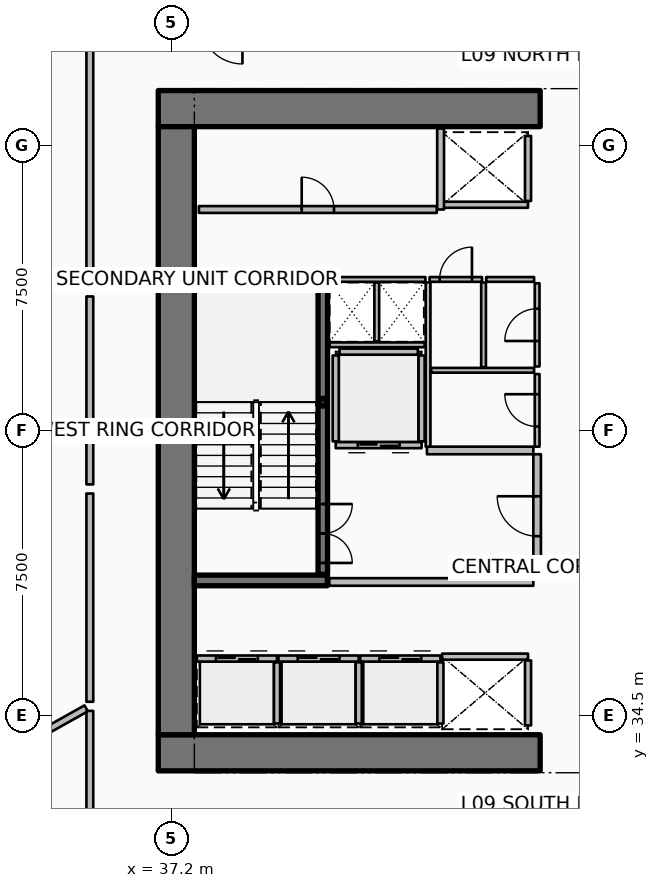
"""IFC4 building model, lengths in metres.
Left out: names, types, materials, properties, quantities, classifications, styles, units other than length and angle.
Written with IfcOpenShell. Run it as: python <this file> out.ifc"""

import sys

from ifc_helpers import new_model, si_unit, direction, frame, frame_2d, origin, origin_2d, place, context, subcontext, project, spatial, rectangle, hollow_rectangle, extrude, element, fill, save


model = new_model("IFC4")
c1 = context("Model", 3, precision=1e-05, world=origin(), true_north=direction((0.0, 1.0)))
c2 = subcontext(c1, "Body", "Model", "MODEL_VIEW")
j1 = project(units=[si_unit("LENGTHUNIT", "METRE"), si_unit("PLANEANGLEUNIT", "RADIAN")], contexts=[c1])
p1 = place(None, origin())
s1 = spatial("IfcSite", under=j1, at=p1, CompositionType="ELEMENT")
p2 = place(p1, origin())
s2 = spatial("IfcBuilding", under=s1, at=p2, CompositionType="ELEMENT")
p3 = place(p2, frame((0.0, 0.0, 41.4)))
s3 = spatial("IfcBuildingStorey", under=s2, at=p3, CompositionType="ELEMENT", Elevation=41.4)
for number, where, z_axis, x_axis in (
    (1, (36.85, 33.525, 0.0), (0.0, 0.0, 1.0), (1.0, 0.0, 0.0)),
    (2, (36.85, 50.475, 0.0), (0.0, 0.0, 1.0), (1.0, 0.0, 0.0)),
):
    element("IfcWall", number, at=place(p3, frame(where, z_axis=z_axis, x_axis=x_axis)), inside=s3, PredefinedType="SHEAR", context=c2, shape_type="SweptSolid", body=[
        extrude(rectangle(XDim=10.05, YDim=0.95, at=frame_2d((5.025, 0.0))), origin(), (0.0, 0.0, 1.0), 3.75),
    ])
p4 = place(p3, frame((37.325, 34.0, 0.0), z_axis=(0.0, 0.0, 1.0), x_axis=(0.0, 1.0, 0.0)))
e3 = element("IfcWall", 3, at=p4, inside=s3, PredefinedType="SHEAR", context=c2, shape_type="SweptSolid", body=[
    extrude(rectangle(XDim=16.0, YDim=0.95, at=frame_2d((8.0, 0.0))), origin(), (0.0, 0.0, 1.0), 3.75),
])
for number, where, z_axis, x_axis in (
    (4, (37.8, 38.06, 0.0), (0.0, 0.0, 1.0), (1.0, 0.0, 0.0)),
    (5, (37.8, 45.94, 0.0), (0.0, 0.0, 1.0), (1.0, 0.0, 0.0)),
):
    element("IfcWall", number, at=place(p3, frame(where, z_axis=z_axis, x_axis=x_axis)), inside=s3, PredefinedType="SHEAR", context=c2, shape_type="SweptSolid", body=[
        extrude(rectangle(XDim=3.5, YDim=0.28, at=frame_2d((1.75, 0.0))), origin(), (0.0, 0.0, 1.0), 3.75),
    ])
p5 = place(p3, frame((41.18, 42.75, 0.0), z_axis=(0.0, 0.0, 1.0), x_axis=(1.0, 0.0, 0.0)))
e6 = element("IfcColumn", 6, at=p5, inside=s3, PredefinedType="COLUMN", context=c2, shape_type="SweptSolid", body=[
    extrude(hollow_rectangle(XDim=0.2, YDim=0.2, WallThickness=0.01, InnerFilletRadius=0.01, OuterFilletRadius=0.02, at=origin_2d()), origin(), (0.0, 0.0, 1.0), 1.67),
])
p6 = place(p3, frame((41.18, 38.22, 0.0), z_axis=(0.0, 0.0, 1.0), x_axis=(0.0, 1.0, 0.0)))
e7 = element("IfcWall", 7, at=p6, inside=s3, PredefinedType="SOLIDWALL", context=c2, shape_type="SweptSolid", body=[
    extrude(rectangle(XDim=7.56, YDim=0.25, at=frame_2d((3.78, 0.0))), origin(), (0.0, 0.0, 1.0), 3.5),
])
p7 = place(p6, frame((0.3, 0.0, 0.0)))
e8 = element("IfcOpeningElement", 8, at=p7, cuts=e7, PredefinedType="OPENING", context=c2, shape_type="SweptSolid", body=[
    extrude(rectangle(XDim=1.55, YDim=2.15, at=frame_2d((0.775, 1.075))), frame((0.0, 0.135, 0.0), z_axis=(0.0, -1.0, 0.0), x_axis=(1.0, 0.0, 0.0)), (0.0, 0.0, 1.0), 0.27),
])
p8 = place(p3, frame((37.865, 36.005, 0.0), z_axis=(0.0, 0.0, 1.0), x_axis=(1.0, 0.0, 0.0)))
e9 = element("IfcWall", 9, at=p8, inside=s3, PredefinedType="PARTITIONING", context=c2, shape_type="SweptSolid", body=[
    extrude(rectangle(XDim=2.11, YDim=0.16, at=frame_2d((1.055, 0.0))), origin(), (0.0, 0.0, 1.0), 3.5),
])
p9 = place(p8, frame((0.505, 0.0, 0.0)))
e10 = element("IfcOpeningElement", 10, at=p9, cuts=e9, PredefinedType="OPENING", context=c2, shape_type="SweptSolid", body=[
    extrude(rectangle(XDim=1.1, YDim=2.1, at=frame_2d((0.55, 1.05))), frame((0.0, 0.09, 0.0), z_axis=(0.0, -1.0, 0.0), x_axis=(1.0, 0.0, 0.0)), (0.0, 0.0, 1.0), 0.18),
])
p10 = place(p3, frame((39.975, 34.295, 0.0), z_axis=(0.0, 0.0, 1.0), x_axis=(0.0, 1.0, 0.0)))
e11 = element("IfcWall", 11, at=p10, inside=s3, PredefinedType="PARTITIONING", context=c2, shape_type="SweptSolid", body=[
    extrude(rectangle(XDim=1.61, YDim=0.16, at=frame_2d((0.805, 0.0))), origin(), (0.0, 0.0, 1.0), 3.5),
])
p11 = place(p3, frame((40.015, 36.005, 0.0), z_axis=(0.0, 0.0, 1.0), x_axis=(1.0, 0.0, 0.0)))
e12 = element("IfcWall", 12, at=p11, inside=s3, PredefinedType="PARTITIONING", context=c2, shape_type="SweptSolid", body=[
    extrude(rectangle(XDim=2.11, YDim=0.16, at=frame_2d((1.055, 0.0))), origin(), (0.0, 0.0, 1.0), 3.5),
])
p12 = place(p11, frame((0.505, 0.0, 0.0)))
e13 = element("IfcOpeningElement", 13, at=p12, cuts=e12, PredefinedType="OPENING", context=c2, shape_type="SweptSolid", body=[
    extrude(rectangle(XDim=1.1, YDim=2.1, at=frame_2d((0.55, 1.05))), frame((0.0, 0.09, 0.0), z_axis=(0.0, -1.0, 0.0), x_axis=(1.0, 0.0, 0.0)), (0.0, 0.0, 1.0), 0.18),
])
p13 = place(p3, frame((42.125, 34.295, 0.0), z_axis=(0.0, 0.0, 1.0), x_axis=(0.0, 1.0, 0.0)))
e14 = element("IfcWall", 14, at=p13, inside=s3, PredefinedType="PARTITIONING", context=c2, shape_type="SweptSolid", body=[
    extrude(rectangle(XDim=1.61, YDim=0.16, at=frame_2d((0.805, 0.0))), origin(), (0.0, 0.0, 1.0), 3.5),
])
p14 = place(p3, frame((42.165, 36.005, 0.0), z_axis=(0.0, 0.0, 1.0), x_axis=(1.0, 0.0, 0.0)))
e15 = element("IfcWall", 15, at=p14, inside=s3, PredefinedType="PARTITIONING", context=c2, shape_type="SweptSolid", body=[
    extrude(rectangle(XDim=2.11, YDim=0.16, at=frame_2d((1.055, 0.0))), origin(), (0.0, 0.0, 1.0), 3.5),
])
p15 = place(p14, frame((0.505, 0.0, 0.0)))
e16 = element("IfcOpeningElement", 16, at=p15, cuts=e15, PredefinedType="OPENING", context=c2, shape_type="SweptSolid", body=[
    extrude(rectangle(XDim=1.1, YDim=2.1, at=frame_2d((0.55, 1.05))), frame((0.0, 0.09, 0.0), z_axis=(0.0, -1.0, 0.0), x_axis=(1.0, 0.0, 0.0)), (0.0, 0.0, 1.0), 0.18),
])
p16 = place(p3, frame((44.275, 34.295, 0.0), z_axis=(0.0, 0.0, 1.0), x_axis=(0.0, 1.0, 0.0)))
e17 = element("IfcWall", 17, at=p16, inside=s3, PredefinedType="PARTITIONING", context=c2, shape_type="SweptSolid", body=[
    extrude(rectangle(XDim=1.61, YDim=0.16, at=frame_2d((0.805, 0.0))), origin(), (0.0, 0.0, 1.0), 3.5),
])
p17 = place(p3, frame((46.58, 47.945, 0.0), z_axis=(0.0, 0.0, 1.0), x_axis=(-1.0, 0.0, 0.0)))
e18 = element("IfcWall", 18, at=p17, inside=s3, PredefinedType="PARTITIONING", context=c2, shape_type="SweptSolid", body=[
    extrude(rectangle(XDim=2.26, YDim=0.16, at=frame_2d((1.13, 0.0))), origin(), (0.0, 0.0, 1.0), 3.5),
])
p18 = place(p3, frame((46.58, 48.045, 0.0), z_axis=(0.0, 0.0, 1.0), x_axis=(0.0, 1.0, 0.0)))
e19 = element("IfcWall", 19, at=p18, inside=s3, PredefinedType="PARTITIONING", context=c2, shape_type="SweptSolid", body=[
    extrude(rectangle(XDim=1.71, YDim=0.16, at=frame_2d((0.855, 0.0))), origin(), (0.0, 0.0, 1.0), 3.5),
])
p19 = place(p3, frame((44.32, 36.055, 0.0), z_axis=(0.0, 0.0, 1.0), x_axis=(1.0, 0.0, 0.0)))
e20 = element("IfcWall", 20, at=p19, inside=s3, PredefinedType="PARTITIONING", context=c2, shape_type="SweptSolid", body=[
    extrude(rectangle(XDim=2.26, YDim=0.16, at=frame_2d((1.13, 0.0))), origin(), (0.0, 0.0, 1.0), 3.5),
])
p20 = place(p3, frame((46.58, 34.245, 0.0), z_axis=(0.0, 0.0, 1.0), x_axis=(0.0, 1.0, 0.0)))
e21 = element("IfcWall", 21, at=p20, inside=s3, PredefinedType="PARTITIONING", context=c2, shape_type="SweptSolid", body=[
    extrude(rectangle(XDim=1.71, YDim=0.16, at=frame_2d((0.855, 0.0))), origin(), (0.0, 0.0, 1.0), 3.5),
])
p21 = place(p3, frame((43.78, 41.62, 0.0), z_axis=(0.0, 0.0, 1.0), x_axis=(-1.0, 0.0, 0.0)))
e22 = element("IfcWall", 22, at=p21, inside=s3, PredefinedType="PARTITIONING", context=c2, shape_type="SweptSolid", body=[
    extrude(rectangle(XDim=2.26, YDim=0.16, at=frame_2d((1.13, 0.0))), origin(), (0.0, 0.0, 1.0), 3.5),
])
p22 = place(p21, frame((0.58, 0.0, 0.0)))
e23 = element("IfcOpeningElement", 23, at=p22, cuts=e22, PredefinedType="OPENING", context=c2, shape_type="SweptSolid", body=[
    extrude(rectangle(XDim=1.1, YDim=2.1, at=frame_2d((0.55, 1.05))), frame((0.0, 0.09, 0.0), z_axis=(0.0, -1.0, 0.0), x_axis=(1.0, 0.0, 0.0)), (0.0, 0.0, 1.0), 0.18),
])
for number, where, z_axis, x_axis in (
    (24, (43.78, 41.72, 0.0), (0.0, 0.0, 1.0), (0.0, 1.0, 0.0)),
    (25, (41.52, 41.72, 0.0), (0.0, 0.0, 1.0), (0.0, 1.0, 0.0)),
):
    element("IfcWall", number, at=place(p3, frame(where, z_axis=z_axis, x_axis=x_axis)), inside=s3, PredefinedType="PARTITIONING", context=c2, shape_type="SweptSolid", body=[
        extrude(rectangle(XDim=2.26, YDim=0.16, at=frame_2d((1.13, 0.0))), origin(), (0.0, 0.0, 1.0), 3.5),
    ])
p23 = place(p3, frame((41.62, 44.08, 0.0), z_axis=(0.0, 0.0, 1.0), x_axis=(1.0, 0.0, 0.0)))
e26 = element("IfcWall", 26, at=p23, inside=s3, PredefinedType="PARTITIONING", context=c2, shape_type="SweptSolid", body=[
    extrude(rectangle(XDim=2.06, YDim=0.16, at=frame_2d((1.03, 0.0))), origin(), (0.0, 0.0, 1.0), 3.5),
])
p24 = place(p3, frame((37.92, 47.82, 0.0), z_axis=(0.0, 0.0, 1.0), x_axis=(1.0, 0.0, 0.0)))
e27 = element("IfcWall", 27, at=p24, inside=s3, PredefinedType="PARTITIONING", context=c2, shape_type="SweptSolid", body=[
    extrude(rectangle(XDim=6.26, YDim=0.18, at=frame_2d((3.13, 0.0))), origin(), (0.0, 0.0, 1.0), 3.5),
])
p25 = place(p24, frame((2.705, 0.0, 0.0)))
e28 = element("IfcOpeningElement", 28, at=p25, cuts=e27, PredefinedType="OPENING", context=c2, shape_type="SweptSolid", body=[
    extrude(rectangle(XDim=0.85, YDim=2.06, at=frame_2d((0.425, 1.03))), frame((0.0, 0.1, 0.0), z_axis=(0.0, -1.0, 0.0), x_axis=(1.0, 0.0, 0.0)), (0.0, 0.0, 1.0), 0.2),
])
p26 = place(p3, frame((44.28, 47.82, 0.0), z_axis=(0.0, 0.0, 1.0), x_axis=(0.0, 1.0, 0.0)))
e29 = element("IfcWall", 29, at=p26, inside=s3, PredefinedType="PARTITIONING", context=c2, shape_type="SweptSolid", body=[
    extrude(rectangle(XDim=2.13, YDim=0.18, at=frame_2d((1.065, 0.0))), origin(), (0.0, 0.0, 1.0), 3.5),
])
p27 = place(p3, frame((41.35, 38.02, 0.0), z_axis=(0.0, 0.0, 1.0), x_axis=(1.0, 0.0, 0.0)))
e30 = element("IfcWall", 30, at=p27, inside=s3, PredefinedType="PARTITIONING", context=c2, shape_type="SweptSolid", body=[
    extrude(rectangle(XDim=5.37, YDim=0.2, at=frame_2d((2.685, 0.0))), origin(), (0.0, 0.0, 1.0), 3.5),
])
p28 = place(p3, frame((43.92, 41.48, 0.0), z_axis=(0.0, 0.0, 1.0), x_axis=(1.0, 0.0, 0.0)))
e31 = element("IfcWall", 31, at=p28, inside=s3, PredefinedType="PARTITIONING", context=c2, shape_type="SweptSolid", body=[
    extrude(rectangle(XDim=2.8, YDim=0.2, at=frame_2d((1.4, 0.0))), origin(), (0.0, 0.0, 1.0), 3.5),
])
p29 = place(p3, frame((46.82, 38.12, 0.0), z_axis=(0.0, 0.0, 1.0), x_axis=(0.0, 1.0, 0.0)))
e32 = element("IfcWall", 32, at=p29, inside=s3, PredefinedType="PARTITIONING", context=c2, shape_type="SweptSolid", body=[
    extrude(rectangle(XDim=3.26, YDim=0.2, at=frame_2d((1.63, 0.0))), origin(), (0.0, 0.0, 1.0), 3.5),
])
p30 = place(p29, frame((1.105, 0.0, 0.0)))
e33 = element("IfcOpeningElement", 33, at=p30, cuts=e32, PredefinedType="OPENING", context=c2, shape_type="SweptSolid", body=[
    extrude(rectangle(XDim=1.05, YDim=2.1, at=frame_2d((0.525, 1.05))), frame((0.0, 0.11, 0.0), z_axis=(0.0, -1.0, 0.0), x_axis=(1.0, 0.0, 0.0)), (0.0, 0.0, 1.0), 0.22),
])
p31 = place(p3, frame((41.36, 44.26, 0.0), z_axis=(0.0, 0.0, 1.0), x_axis=(1.0, 0.0, 0.0)))
e34 = element("IfcWall", 34, at=p31, inside=s3, PredefinedType="PARTITIONING", context=c2, shape_type="SweptSolid", body=[
    extrude(rectangle(XDim=2.5, YDim=0.125, at=frame_2d((1.25, 0.0))), origin(), (0.0, 0.0, 1.0), 2.94),
])
p32 = place(p3, frame((42.6, 44.35, 0.0), z_axis=(0.0, 0.0, 1.0), x_axis=(0.0, 1.0, 0.0)))
e35 = element("IfcWall", 35, at=p32, inside=s3, PredefinedType="PARTITIONING", context=c2, shape_type="SweptSolid", body=[
    extrude(rectangle(XDim=1.55, YDim=0.125, at=frame_2d((0.775, 0.0))), origin(), (0.0, 0.0, 1.0), 2.94),
])
p33 = place(p3, frame((43.95, 41.58, 0.0), z_axis=(0.0, 0.0, 1.0), x_axis=(0.0, 1.0, 0.0)))
e36 = element("IfcWall", 36, at=p33, inside=s3, PredefinedType="PARTITIONING", context=c2, shape_type="SweptSolid", body=[
    extrude(rectangle(XDim=4.32, YDim=0.125, at=frame_2d((2.16, 0.0))), origin(), (0.0, 0.0, 1.0), 2.94),
])
p34 = place(p3, frame((44.03, 43.59, 0.0), z_axis=(0.0, 0.0, 1.0), x_axis=(1.0, 0.0, 0.0)))
e37 = element("IfcWall", 37, at=p34, inside=s3, PredefinedType="PARTITIONING", context=c2, shape_type="SweptSolid", body=[
    extrude(rectangle(XDim=2.71, YDim=0.125, at=frame_2d((1.355, 0.0))), origin(), (0.0, 0.0, 1.0), 2.94),
])
p35 = place(p3, frame((45.41, 43.67, 0.0), z_axis=(0.0, 0.0, 1.0), x_axis=(0.0, 1.0, 0.0)))
e38 = element("IfcWall", 38, at=p35, inside=s3, PredefinedType="PARTITIONING", context=c2, shape_type="SweptSolid", body=[
    extrude(rectangle(XDim=2.23, YDim=0.125, at=frame_2d((1.115, 0.0))), origin(), (0.0, 0.0, 1.0), 2.94),
])
p36 = place(p3, frame((46.82, 41.58, 0.0), z_axis=(0.0, 0.0, 1.0), x_axis=(0.0, 1.0, 0.0)))
e39 = element("IfcWall", 39, at=p36, inside=s3, PredefinedType="PARTITIONING", context=c2, shape_type="SweptSolid", body=[
    extrude(rectangle(XDim=1.91, YDim=0.125, at=frame_2d((0.955, 0.0))), origin(), (0.0, 0.0, 1.0), 2.94),
])
p37 = place(p36, frame((0.53, 0.0, 0.0)))
e40 = element("IfcOpeningElement", 40, at=p37, cuts=e39, PredefinedType="OPENING", context=c2, shape_type="SweptSolid", body=[
    extrude(rectangle(XDim=0.85, YDim=2.06, at=frame_2d((0.425, 1.03))), frame((0.0, 0.073, 0.0), z_axis=(0.0, -1.0, 0.0), x_axis=(1.0, 0.0, 0.0)), (0.0, 0.0, 1.0), 0.145),
])
p38 = place(p3, frame((46.82, 43.69, 0.0), z_axis=(0.0, 0.0, 1.0), x_axis=(0.0, 1.0, 0.0)))
e41 = element("IfcWall", 41, at=p38, inside=s3, PredefinedType="PARTITIONING", context=c2, shape_type="SweptSolid", body=[
    extrude(rectangle(XDim=2.19, YDim=0.125, at=frame_2d((1.095, 0.0))), origin(), (0.0, 0.0, 1.0), 2.94),
])
p39 = place(p38, frame((0.67, 0.0, 0.0)))
e42 = element("IfcOpeningElement", 42, at=p39, cuts=e41, PredefinedType="OPENING", context=c2, shape_type="SweptSolid", body=[
    extrude(rectangle(XDim=0.85, YDim=2.06, at=frame_2d((0.425, 1.03))), frame((0.0, 0.073, 0.0), z_axis=(0.0, -1.0, 0.0), x_axis=(1.0, 0.0, 0.0)), (0.0, 0.0, 1.0), 0.145),
])
p40 = place(p3, frame((41.35, 45.98, 0.0), z_axis=(0.0, 0.0, 1.0), x_axis=(1.0, 0.0, 0.0)))
e43 = element("IfcWall", 43, at=p40, inside=s3, PredefinedType="PARTITIONING", context=c2, shape_type="SweptSolid", body=[
    extrude(rectangle(XDim=2.53, YDim=0.125, at=frame_2d((1.265, 0.0))), origin(), (0.0, 0.0, 1.0), 2.94),
])
p41 = place(p3, frame((43.99, 45.98, 0.0), z_axis=(0.0, 0.0, 1.0), x_axis=(1.0, 0.0, 0.0)))
e44 = element("IfcWall", 44, at=p41, inside=s3, PredefinedType="PARTITIONING", context=c2, shape_type="SweptSolid", body=[
    extrude(rectangle(XDim=1.38, YDim=0.125, at=frame_2d((0.69, 0.0))), origin(), (0.0, 0.0, 1.0), 2.94),
])
p42 = place(p41, frame((0.265, 0.0, 0.0)))
e45 = element("IfcOpeningElement", 45, at=p42, cuts=e44, PredefinedType="OPENING", context=c2, shape_type="SweptSolid", body=[
    extrude(rectangle(XDim=0.85, YDim=2.06, at=frame_2d((0.425, 1.03))), frame((0.0, 0.073, 0.0), z_axis=(0.0, -1.0, 0.0), x_axis=(1.0, 0.0, 0.0)), (0.0, 0.0, 1.0), 0.145),
])
p43 = place(p3, frame((45.48, 45.98, 0.0), z_axis=(0.0, 0.0, 1.0), x_axis=(1.0, 0.0, 0.0)))
e46 = element("IfcWall", 46, at=p43, inside=s3, PredefinedType="PARTITIONING", context=c2, shape_type="SweptSolid", body=[
    extrude(rectangle(XDim=1.26, YDim=0.125, at=frame_2d((0.63, 0.0))), origin(), (0.0, 0.0, 1.0), 2.94),
])
p44 = place(p3, frame((34.954, 34.694, 0.0), z_axis=(0.0, 0.0, 1.0), x_axis=(-0.872493465611, -0.488625779577, 0.0)))
e47 = element("IfcWall", 47, at=p44, inside=s3, PredefinedType="PARTITIONING", context=c2, shape_type="SweptSolid", body=[
    extrude(rectangle(XDim=16.586, YDim=0.18, at=frame_2d((8.293, 0.0))), origin(), (0.0, 0.0, 1.0), 2.867),
])
p45 = place(p3, frame((35.05, 52.089, 0.0), z_axis=(0.0, 0.0, 1.0), x_axis=(0.0, -1.0, 0.0)))
e48 = element("IfcWall", 48, at=p45, inside=s3, PredefinedType="PARTITIONING", context=c2, shape_type="SweptSolid", body=[
    extrude(rectangle(XDim=6.317, YDim=0.18, at=frame_2d((3.158, 0.0))), origin(), (0.0, 0.0, 1.0), 2.867),
])
p46 = place(p3, frame((35.05, 45.532, 0.0), z_axis=(0.0, 0.0, 1.0), x_axis=(0.0, -1.0, 0.0)))
e49 = element("IfcWall", 49, at=p46, inside=s3, PredefinedType="PARTITIONING", context=c2, shape_type="SweptSolid", body=[
    extrude(rectangle(XDim=4.945, YDim=0.18, at=frame_2d((2.472, 0.0))), origin(), (0.0, 0.0, 1.0), 2.867),
])
p47 = place(p3, frame((35.05, 40.347, 0.0), z_axis=(0.0, 0.0, 1.0), x_axis=(0.0, -1.0, 0.0)))
e50 = element("IfcWall", 50, at=p47, inside=s3, PredefinedType="PARTITIONING", context=c2, shape_type="SweptSolid", body=[
    extrude(rectangle(XDim=5.48, YDim=0.18, at=frame_2d((2.74, 0.0))), origin(), (0.0, 0.0, 1.0), 2.867),
])
p48 = place(p3, frame((35.05, 34.628, 0.0), z_axis=(0.0, 0.0, 1.0), x_axis=(0.0, -1.0, 0.0)))
e51 = element("IfcWall", 51, at=p48, inside=s3, PredefinedType="PARTITIONING", context=c2, shape_type="SweptSolid", body=[
    extrude(rectangle(XDim=3.258, YDim=0.18, at=frame_2d((1.629, 0.0))), origin(), (0.0, 0.0, 1.0), 2.867),
])
p49 = place(p7, origin())
e52 = element("IfcDoor", 52, at=p49, inside=s3, OperationType="DOUBLE_DOOR_SINGLE_SWING", PredefinedType="DOOR", context=c2, shape_type="SweptSolid", body=[
    extrude(rectangle(XDim=1.55, YDim=2.15, at=frame_2d((0.775, 1.075))), frame((0.0, 0.025, 0.0), z_axis=(0.0, -1.0, 0.0), x_axis=(1.0, 0.0, 0.0)), (0.0, 0.0, 1.0), 0.05),
])
fill(e8, e52)
p50 = place(p9, origin())
e53 = element("IfcDoor", 53, at=p50, inside=s3, OperationType="DOUBLE_DOOR_SLIDING", PredefinedType="DOOR", context=c2, shape_type="SweptSolid", body=[
    extrude(rectangle(XDim=1.1, YDim=2.1, at=frame_2d((0.55, 1.05))), frame((0.0, 0.025, 0.0), z_axis=(0.0, -1.0, 0.0), x_axis=(1.0, 0.0, 0.0)), (0.0, 0.0, 1.0), 0.05),
])
fill(e10, e53)
p51 = place(p12, origin())
e54 = element("IfcDoor", 54, at=p51, inside=s3, OperationType="DOUBLE_DOOR_SLIDING", PredefinedType="DOOR", context=c2, shape_type="SweptSolid", body=[
    extrude(rectangle(XDim=1.1, YDim=2.1, at=frame_2d((0.55, 1.05))), frame((0.0, 0.025, 0.0), z_axis=(0.0, -1.0, 0.0), x_axis=(1.0, 0.0, 0.0)), (0.0, 0.0, 1.0), 0.05),
])
fill(e13, e54)
p52 = place(p15, origin())
e55 = element("IfcDoor", 55, at=p52, inside=s3, OperationType="DOUBLE_DOOR_SLIDING", PredefinedType="DOOR", context=c2, shape_type="SweptSolid", body=[
    extrude(rectangle(XDim=1.1, YDim=2.1, at=frame_2d((0.55, 1.05))), frame((0.0, 0.025, 0.0), z_axis=(0.0, -1.0, 0.0), x_axis=(1.0, 0.0, 0.0)), (0.0, 0.0, 1.0), 0.05),
])
fill(e16, e55)
p53 = place(p22, origin())
e56 = element("IfcDoor", 56, at=p53, inside=s3, OperationType="DOUBLE_DOOR_SLIDING", PredefinedType="DOOR", context=c2, shape_type="SweptSolid", body=[
    extrude(rectangle(XDim=1.1, YDim=2.1, at=frame_2d((0.55, 1.05))), frame((0.0, 0.025, 0.0), z_axis=(0.0, -1.0, 0.0), x_axis=(1.0, 0.0, 0.0)), (0.0, 0.0, 1.0), 0.05),
])
fill(e23, e56)
p54 = place(p25, origin())
e57 = element("IfcDoor", 57, at=p54, inside=s3, OperationType="SINGLE_SWING_LEFT", PredefinedType="DOOR", context=c2, shape_type="SweptSolid", body=[
    extrude(rectangle(XDim=0.85, YDim=2.06, at=frame_2d((0.425, 1.03))), frame((0.0, 0.025, 0.0), z_axis=(0.0, -1.0, 0.0), x_axis=(1.0, 0.0, 0.0)), (0.0, 0.0, 1.0), 0.05),
])
fill(e28, e57)
p55 = place(p30, origin())
e58 = element("IfcDoor", 58, at=p55, inside=s3, OperationType="SINGLE_SWING_RIGHT", PredefinedType="DOOR", context=c2, shape_type="SweptSolid", body=[
    extrude(rectangle(XDim=1.05, YDim=2.1, at=frame_2d((0.525, 1.05))), frame((0.0, 0.025, 0.0), z_axis=(0.0, -1.0, 0.0), x_axis=(1.0, 0.0, 0.0)), (0.0, 0.0, 1.0), 0.05),
])
fill(e33, e58)
p56 = place(p37, origin())
e59 = element("IfcDoor", 59, at=p56, inside=s3, OperationType="SINGLE_SWING_RIGHT", PredefinedType="DOOR", context=c2, shape_type="SweptSolid", body=[
    extrude(rectangle(XDim=0.85, YDim=2.06, at=frame_2d((0.425, 1.03))), frame((0.0, 0.025, 0.0), z_axis=(0.0, -1.0, 0.0), x_axis=(1.0, 0.0, 0.0)), (0.0, 0.0, 1.0), 0.05),
])
fill(e40, e59)
p57 = place(p39, origin())
e60 = element("IfcDoor", 60, at=p57, inside=s3, OperationType="SINGLE_SWING_LEFT", PredefinedType="DOOR", context=c2, shape_type="SweptSolid", body=[
    extrude(rectangle(XDim=0.85, YDim=2.06, at=frame_2d((0.425, 1.03))), frame((0.0, 0.025, 0.0), z_axis=(0.0, -1.0, 0.0), x_axis=(1.0, 0.0, 0.0)), (0.0, 0.0, 1.0), 0.05),
])
fill(e42, e60)
p58 = place(p42, origin())
e61 = element("IfcDoor", 61, at=p58, inside=s3, OperationType="SINGLE_SWING_RIGHT", PredefinedType="DOOR", context=c2, shape_type="SweptSolid", body=[
    extrude(rectangle(XDim=0.85, YDim=2.06, at=frame_2d((0.425, 1.03))), frame((0.0, 0.025, 0.0), z_axis=(0.0, -1.0, 0.0), x_axis=(1.0, 0.0, 0.0)), (0.0, 0.0, 1.0), 0.05),
])
fill(e45, e61)
save(model, sys.argv[1])
